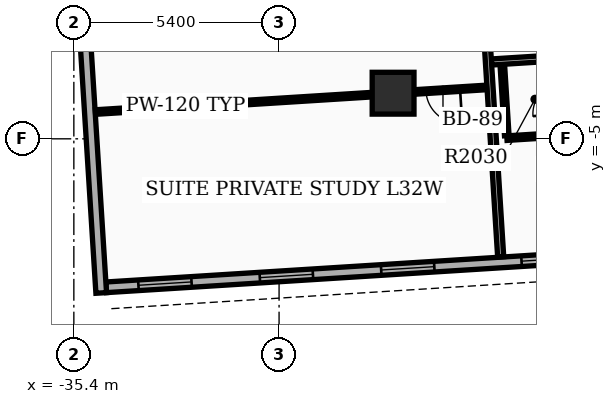
"""IFC4 building model, lengths in metres.
Left out: names, types, materials, properties, quantities, classifications, styles, units other than length and angle.
Written with IfcOpenShell. Run it as: python <this file> out.ifc"""

import sys

from ifc_helpers import new_model, si_unit, direction, frame, frame_2d, origin, origin_2d, place, context, subcontext, project, spatial, rectangle, extrude, element, fill, save


model = new_model("IFC4")
c1 = context("Model", 3, precision=1e-05, world=origin(), true_north=direction((0.0, 1.0)))
c2 = subcontext(c1, "Body", "Model", "MODEL_VIEW")
j1 = project(units=[si_unit("LENGTHUNIT", "METRE"), si_unit("PLANEANGLEUNIT", "RADIAN")], contexts=[c1])
p1 = place(None, origin())
s1 = spatial("IfcSite", under=j1, at=p1, CompositionType="ELEMENT")
p2 = place(p1, origin())
s2 = spatial("IfcBuilding", under=s1, at=p2, CompositionType="ELEMENT")
p3 = place(p2, frame((0.0, 0.0, 128.1)))
s3 = spatial("IfcBuildingStorey", under=s2, at=p3, CompositionType="ELEMENT", Elevation=128.1)
p4 = place(p3, frame((-27.0, -3.8, 0.0), z_axis=(0.0, 0.0, 1.0), x_axis=(1.0, 0.0, 0.0)))
e1 = element("IfcColumn", 1, at=p4, inside=s3, PredefinedType="COLUMN", context=c2, shape_type="SweptSolid", body=[
    extrude(rectangle(XDim=1.1, YDim=1.1, at=origin_2d()), origin(), (0.0, 0.0, 1.0), 3.9),
])
p5 = place(p3, frame((-34.549, -8.907, 0.0), z_axis=(0.0, 0.0, 1.0), x_axis=(0.99802635503, 0.06279645424, 0.0)))
e2 = element("IfcWall", 2, at=p5, inside=s3, PredefinedType="STANDARD", context=c2, shape_type="SweptSolid", body=[
    extrude(rectangle(XDim=20.1, YDim=0.28, at=frame_2d((10.05, 0.0))), origin(), (0.0, 0.0, 1.0), 2.97),
])
p6 = place(p5, frame((0.85, 0.0, 0.8)))
e3 = element("IfcOpeningElement", 3, at=p6, cuts=e2, PredefinedType="OPENING", context=c2, shape_type="SweptSolid", body=[
    extrude(rectangle(XDim=1.4, YDim=1.6, at=frame_2d((0.7, 0.8))), frame((0.0, 0.15, 0.0), z_axis=(0.0, -1.0, 0.0), x_axis=(1.0, 0.0, 0.0)), (0.0, 0.0, 1.0), 0.3),
])
p7 = place(p5, frame((4.05, 0.0, 0.8)))
e4 = element("IfcOpeningElement", 4, at=p7, cuts=e2, PredefinedType="OPENING", context=c2, shape_type="SweptSolid", body=[
    extrude(rectangle(XDim=1.4, YDim=1.6, at=frame_2d((0.7, 0.8))), frame((0.0, 0.15, 0.0), z_axis=(0.0, -1.0, 0.0), x_axis=(1.0, 0.0, 0.0)), (0.0, 0.0, 1.0), 0.3),
])
p8 = place(p5, frame((7.25, 0.0, 0.8)))
e5 = element("IfcOpeningElement", 5, at=p8, cuts=e2, PredefinedType="OPENING", context=c2, shape_type="SweptSolid", body=[
    extrude(rectangle(XDim=1.4, YDim=1.6, at=frame_2d((0.7, 0.8))), frame((0.0, 0.15, 0.0), z_axis=(0.0, -1.0, 0.0), x_axis=(1.0, 0.0, 0.0)), (0.0, 0.0, 1.0), 0.3),
])
p9 = place(p5, frame((10.95, 0.0, 0.8)))
e6 = element("IfcOpeningElement", 6, at=p9, cuts=e2, PredefinedType="OPENING", context=c2, shape_type="SweptSolid", body=[
    extrude(rectangle(XDim=1.4, YDim=1.6, at=frame_2d((0.7, 0.8))), frame((0.0, 0.15, 0.0), z_axis=(0.0, -1.0, 0.0), x_axis=(1.0, 0.0, 0.0)), (0.0, 0.0, 1.0), 0.3),
])
p10 = place(p5, frame((14.799, 0.0, 0.85)))
e7 = element("IfcOpeningElement", 7, at=p10, cuts=e2, PredefinedType="OPENING", context=c2, shape_type="SweptSolid", body=[
    extrude(rectangle(XDim=1.2, YDim=1.6, at=frame_2d((0.6, 0.8))), frame((0.0, 0.15, 0.0), z_axis=(0.0, -1.0, 0.0), x_axis=(1.0, 0.0, 0.0)), (0.0, 0.0, 1.0), 0.3),
])
p11 = place(p3, frame((-35.541, 4.637, 0.0), z_axis=(0.0, 0.0, 1.0), x_axis=(0.062797041623, -0.998026318072, 0.0)))
e8 = element("IfcWall", 8, at=p11, inside=s3, PredefinedType="STANDARD", context=c2, shape_type="SweptSolid", body=[
    extrude(rectangle(XDim=13.72, YDim=0.28, at=frame_2d((6.86, 0.0))), origin(), (0.0, 0.0, 1.0), 2.97),
])
p12 = place(p11, frame((0.85, 0.0, 0.85)))
e9 = element("IfcOpeningElement", 9, at=p12, cuts=e8, PredefinedType="OPENING", context=c2, shape_type="SweptSolid", body=[
    extrude(rectangle(XDim=1.0, YDim=1.5, at=frame_2d((0.5, 0.75))), frame((0.0, 0.15, 0.0), z_axis=(0.0, -1.0, 0.0), x_axis=(1.0, 0.0, 0.0)), (0.0, 0.0, 1.0), 0.3),
])
p13 = place(p3, frame((-14.73, -2.37, 0.0), z_axis=(0.0, 0.0, 1.0), x_axis=(-0.998026342456, -0.062796654085, 0.0)))
e10 = element("IfcWall", 10, at=p13, inside=s3, PredefinedType="PARTITIONING", context=c2, shape_type="SweptSolid", body=[
    extrude(rectangle(XDim=9.7, YDim=0.16, at=frame_2d((4.85, 0.0))), origin(), (0.0, 0.0, 1.0), 2.96),
])
p14 = place(p13, frame((2.575, 0.0, 0.0)))
e11 = element("IfcOpeningElement", 11, at=p14, cuts=e10, PredefinedType="OPENING", context=c2, shape_type="SweptSolid", body=[
    extrude(rectangle(XDim=0.96, YDim=2.15, at=frame_2d((0.48, 1.075))), frame((0.0, 0.09, 0.0), z_axis=(0.0, -1.0, 0.0), x_axis=(1.0, 0.0, 0.0)), (0.0, 0.0, 1.0), 0.18),
])
p15 = place(p13, frame((6.467, 0.0, 0.0)))
e12 = element("IfcOpeningElement", 12, at=p15, cuts=e10, PredefinedType="OPENING", context=c2, shape_type="SweptSolid", body=[
    extrude(rectangle(XDim=0.96, YDim=2.15, at=frame_2d((0.48, 1.075))), frame((0.0, 0.09, 0.0), z_axis=(0.0, -1.0, 0.0), x_axis=(1.0, 0.0, 0.0)), (0.0, 0.0, 1.0), 0.18),
])
p16 = place(p3, frame((-24.009, -4.917, 0.0), z_axis=(0.0, 0.0, 1.0), x_axis=(-0.062779145668, 0.998027443946, 0.0)))
e13 = element("IfcWall", 13, at=p16, inside=s3, PredefinedType="PARTITIONING", context=c2, shape_type="SweptSolid", body=[
    extrude(rectangle(XDim=1.82, YDim=0.12, at=frame_2d((0.91, 0.0))), origin(), (0.0, 0.0, 1.0), 2.96),
])
p17 = place(p3, frame((-22.408, -4.882, 0.0), z_axis=(0.0, 0.0, 1.0), x_axis=(-0.998021579404, -0.062872307449, 0.0)))
e14 = element("IfcWall", 14, at=p17, inside=s3, PredefinedType="PARTITIONING", context=c2, shape_type="SweptSolid", body=[
    extrude(rectangle(XDim=1.6, YDim=0.12, at=frame_2d((0.8, 0.0))), origin(), (0.0, 0.0, 1.0), 2.96),
])
p18 = place(p3, frame((-24.169, -8.105, 0.0), z_axis=(0.0, 0.0, 1.0), x_axis=(-0.062800362452, 0.998026109115, 0.0)))
e15 = element("IfcWall", 15, at=p18, inside=s3, PredefinedType="PARTITIONING", context=c2, shape_type="SweptSolid", body=[
    extrude(rectangle(XDim=13.144, YDim=0.16, at=frame_2d((6.572, 0.0))), origin(), (0.0, 0.0, 1.0), 2.96),
])
p19 = place(p18, frame((5.512, 0.0, 0.0)))
e16 = element("IfcOpeningElement", 16, at=p19, cuts=e15, PredefinedType="OPENING", context=c2, shape_type="SweptSolid", body=[
    extrude(rectangle(XDim=0.96, YDim=2.15, at=frame_2d((0.48, 1.075))), frame((0.0, 0.09, 0.0), z_axis=(0.0, -1.0, 0.0), x_axis=(1.0, 0.0, 0.0)), (0.0, 0.0, 1.0), 0.18),
])
p20 = place(p3, frame((-24.539, -3.648, 0.0), z_axis=(0.0, 0.0, 1.0), x_axis=(-0.998026977373, -0.062786562543, 0.0)))
e17 = element("IfcWall", 17, at=p20, inside=s3, PredefinedType="PARTITIONING", context=c2, shape_type="SweptSolid", body=[
    extrude(rectangle(XDim=10.312, YDim=0.12, at=frame_2d((5.156, 0.0))), origin(), (0.0, 0.0, 1.0), 2.96),
])
p21 = place(p20, frame((0.7, 0.0, 0.0)))
e18 = element("IfcOpeningElement", 18, at=p21, cuts=e17, PredefinedType="OPENING", context=c2, shape_type="SweptSolid", body=[
    extrude(rectangle(XDim=0.9, YDim=2.1, at=frame_2d((0.45, 1.05))), frame((0.0, 0.07, 0.0), z_axis=(0.0, -1.0, 0.0), x_axis=(1.0, 0.0, 0.0)), (0.0, 0.0, 1.0), 0.14),
])
p22 = place(p6, origin())
e19 = element("IfcWindow", 19, at=p22, inside=s3, PartitioningType="SINGLE_PANEL", PredefinedType="WINDOW", context=c2, shape_type="SweptSolid", body=[
    extrude(rectangle(XDim=1.4, YDim=1.6, at=frame_2d((0.7, 0.8))), frame((0.0, 0.03, 0.0), z_axis=(0.0, -1.0, 0.0), x_axis=(1.0, 0.0, 0.0)), (0.0, 0.0, 1.0), 0.06),
])
fill(e3, e19)
p23 = place(p7, origin())
e20 = element("IfcWindow", 20, at=p23, inside=s3, PartitioningType="SINGLE_PANEL", PredefinedType="WINDOW", context=c2, shape_type="SweptSolid", body=[
    extrude(rectangle(XDim=1.4, YDim=1.6, at=frame_2d((0.7, 0.8))), frame((0.0, 0.03, 0.0), z_axis=(0.0, -1.0, 0.0), x_axis=(1.0, 0.0, 0.0)), (0.0, 0.0, 1.0), 0.06),
])
fill(e4, e20)
p24 = place(p8, origin())
e21 = element("IfcWindow", 21, at=p24, inside=s3, PartitioningType="SINGLE_PANEL", PredefinedType="WINDOW", context=c2, shape_type="SweptSolid", body=[
    extrude(rectangle(XDim=1.4, YDim=1.6, at=frame_2d((0.7, 0.8))), frame((0.0, 0.03, 0.0), z_axis=(0.0, -1.0, 0.0), x_axis=(1.0, 0.0, 0.0)), (0.0, 0.0, 1.0), 0.06),
])
fill(e5, e21)
p25 = place(p9, origin())
e22 = element("IfcWindow", 22, at=p25, inside=s3, PartitioningType="SINGLE_PANEL", PredefinedType="WINDOW", context=c2, shape_type="SweptSolid", body=[
    extrude(rectangle(XDim=1.4, YDim=1.6, at=frame_2d((0.7, 0.8))), frame((0.0, 0.03, 0.0), z_axis=(0.0, -1.0, 0.0), x_axis=(1.0, 0.0, 0.0)), (0.0, 0.0, 1.0), 0.06),
])
fill(e6, e22)
p26 = place(p21, origin())
e23 = element("IfcDoor", 23, at=p26, inside=s3, OperationType="SINGLE_SWING_LEFT", PredefinedType="DOOR", context=c2, shape_type="SweptSolid", body=[
    extrude(rectangle(XDim=0.9, YDim=2.1, at=frame_2d((0.45, 1.05))), frame((0.0, 0.025, 0.0), z_axis=(0.0, -1.0, 0.0), x_axis=(1.0, 0.0, 0.0)), (0.0, 0.0, 1.0), 0.05),
])
fill(e18, e23)
save(model, sys.argv[1])
